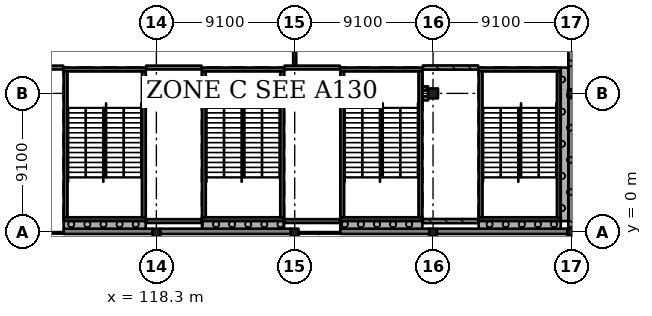
"""IFC4 building model, lengths in metres.
Left out: names, types, materials, properties, quantities, classifications, styles, units other than length and angle.
Written with IfcOpenShell. Run it as: python <this file> out.ifc"""

import sys

from ifc_helpers import new_model, si_unit, direction, frame, frame_2d, origin, origin_2d, place, context, subcontext, project, spatial, rectangle, extrude, element, fill, save


model = new_model("IFC4")
c1 = context("Model", 3, precision=1e-05, world=origin(), true_north=direction((0.0, 1.0)))
c2 = subcontext(c1, "Body", "Model", "MODEL_VIEW")
j1 = project(units=[si_unit("LENGTHUNIT", "METRE"), si_unit("PLANEANGLEUNIT", "RADIAN")], contexts=[c1])
p1 = place(None, origin())
s1 = spatial("IfcSite", under=j1, at=p1, CompositionType="ELEMENT")
p2 = place(p1, origin())
s2 = spatial("IfcBuilding", under=s1, at=p2, CompositionType="ELEMENT")
p3 = place(p2, frame((0.0, 0.0, 10.92)))
s3 = spatial("IfcBuildingStorey", under=s2, at=p3, CompositionType="ELEMENT", Elevation=10.92)
p4 = place(p3, frame((118.3, -0.05, 0.0), z_axis=(0.0, 0.0, 1.0), x_axis=(1.0, 0.0, 0.0)))
e1 = element("IfcColumn", 1, at=p4, inside=s3, PredefinedType="COLUMN", context=c2, shape_type="SweptSolid", body=[
    extrude(rectangle(XDim=0.5, YDim=0.5, at=origin_2d()), origin(), (0.0, 0.0, 1.0), 4.55),
])
p5 = place(p3, frame((118.3, 9.1, 0.0), z_axis=(0.0, 0.0, 1.0), x_axis=(1.0, 0.0, 0.0)))
e2 = element("IfcColumn", 2, at=p5, inside=s3, PredefinedType="COLUMN", context=c2, shape_type="SweptSolid", body=[
    extrude(rectangle(XDim=0.65, YDim=0.65, at=origin_2d()), origin(), (0.0, 0.0, 1.0), 4.55),
])
p6 = place(p3, frame((127.4, -0.05, 0.0), z_axis=(0.0, 0.0, 1.0), x_axis=(1.0, 0.0, 0.0)))
e3 = element("IfcColumn", 3, at=p6, inside=s3, PredefinedType="COLUMN", context=c2, shape_type="SweptSolid", body=[
    extrude(rectangle(XDim=0.5, YDim=0.5, at=origin_2d()), origin(), (0.0, 0.0, 1.0), 4.55),
])
p7 = place(p3, frame((127.4, 9.1, 0.0), z_axis=(0.0, 0.0, 1.0), x_axis=(1.0, 0.0, 0.0)))
e4 = element("IfcColumn", 4, at=p7, inside=s3, PredefinedType="COLUMN", context=c2, shape_type="SweptSolid", body=[
    extrude(rectangle(XDim=0.65, YDim=0.65, at=origin_2d()), origin(), (0.0, 0.0, 1.0), 4.55),
])
p8 = place(p3, frame((136.5, -0.05, 0.0), z_axis=(0.0, 0.0, 1.0), x_axis=(1.0, 0.0, 0.0)))
e5 = element("IfcColumn", 5, at=p8, inside=s3, PredefinedType="COLUMN", context=c2, shape_type="SweptSolid", body=[
    extrude(rectangle(XDim=0.5, YDim=0.5, at=origin_2d()), origin(), (0.0, 0.0, 1.0), 4.55),
])
p9 = place(p3, frame((136.5, 9.1, 0.0), z_axis=(0.0, 0.0, 1.0), x_axis=(1.0, 0.0, 0.0)))
e6 = element("IfcColumn", 6, at=p9, inside=s3, PredefinedType="COLUMN", context=c2, shape_type="SweptSolid", body=[
    extrude(rectangle(XDim=0.65, YDim=0.65, at=origin_2d()), origin(), (0.0, 0.0, 1.0), 4.55),
])
for number, where, z_axis, x_axis in (
    (7, (145.6, 0.0, 0.0), (0.0, 0.0, 1.0), (1.0, 0.0, 0.0)),
    (8, (145.625, 9.1, 0.0), (0.0, 0.0, 1.0), (1.0, 0.0, 0.0)),
):
    element("IfcColumn", number, at=place(p3, frame(where, z_axis=z_axis, x_axis=x_axis)), inside=s3, PredefinedType="COLUMN", context=c2, shape_type="SweptSolid", body=[
        extrude(rectangle(XDim=0.5, YDim=0.5, at=origin_2d()), origin(), (0.0, 0.0, 1.0), 4.55),
    ])
p10 = place(p3, frame((144.9, 0.825, 0.0), z_axis=(0.0, 0.0, 1.0), x_axis=(-1.0, 0.0, 0.0)))
e9 = element("IfcWall", 9, at=p10, inside=s3, PredefinedType="SHEAR", context=c2, shape_type="SweptSolid", body=[
    extrude(rectangle(XDim=5.4, YDim=0.25, at=frame_2d((2.7, 0.0))), origin(), (0.0, 0.0, 1.0), 4.55),
])
p11 = place(p3, frame((144.9, 10.675, 0.0), z_axis=(0.0, 0.0, 1.0), x_axis=(-1.0, 0.0, 0.0)))
e10 = element("IfcWall", 10, at=p11, inside=s3, PredefinedType="SHEAR", context=c2, shape_type="SweptSolid", body=[
    extrude(rectangle(XDim=5.4, YDim=0.25, at=frame_2d((2.7, 0.0))), origin(), (0.0, 0.0, 1.0), 4.55),
])
p12 = place(p11, frame((1.5, 0.0, 0.0)))
e11 = element("IfcOpeningElement", 11, at=p12, cuts=e10, PredefinedType="OPENING", context=c2, shape_type="SweptSolid", body=[
    extrude(rectangle(XDim=2.4, YDim=2.1, at=frame_2d((1.2, 1.05))), frame((0.0, 0.135, 0.0), z_axis=(0.0, -1.0, 0.0), x_axis=(1.0, 0.0, 0.0)), (0.0, 0.0, 1.0), 0.27),
])
for number, where, z_axis, x_axis in (
    (12, (139.625, 10.55, 0.0), (0.0, 0.0, 1.0), (0.0, -1.0, 0.0)),
    (13, (144.775, 10.55, 0.0), (0.0, 0.0, 1.0), (0.0, -1.0, 0.0)),
):
    element("IfcWall", number, at=place(p3, frame(where, z_axis=z_axis, x_axis=x_axis)), inside=s3, PredefinedType="SHEAR", context=c2, shape_type="SweptSolid", body=[
        extrude(rectangle(XDim=9.6, YDim=0.25, at=frame_2d((4.8, 0.0))), origin(), (0.0, 0.0, 1.0), 4.55),
    ])
p13 = place(p3, frame((135.8, 0.825, 0.0), z_axis=(0.0, 0.0, 1.0), x_axis=(-1.0, 0.0, 0.0)))
e14 = element("IfcWall", 14, at=p13, inside=s3, PredefinedType="SHEAR", context=c2, shape_type="SweptSolid", body=[
    extrude(rectangle(XDim=5.4, YDim=0.25, at=frame_2d((2.7, 0.0))), origin(), (0.0, 0.0, 1.0), 4.55),
])
p14 = place(p3, frame((135.8, 10.675, 0.0), z_axis=(0.0, 0.0, 1.0), x_axis=(-1.0, 0.0, 0.0)))
e15 = element("IfcWall", 15, at=p14, inside=s3, PredefinedType="SHEAR", context=c2, shape_type="SweptSolid", body=[
    extrude(rectangle(XDim=5.4, YDim=0.25, at=frame_2d((2.7, 0.0))), origin(), (0.0, 0.0, 1.0), 4.55),
])
p15 = place(p14, frame((1.5, 0.0, 0.0)))
e16 = element("IfcOpeningElement", 16, at=p15, cuts=e15, PredefinedType="OPENING", context=c2, shape_type="SweptSolid", body=[
    extrude(rectangle(XDim=2.4, YDim=2.1, at=frame_2d((1.2, 1.05))), frame((0.0, 0.135, 0.0), z_axis=(0.0, -1.0, 0.0), x_axis=(1.0, 0.0, 0.0)), (0.0, 0.0, 1.0), 0.27),
])
for number, where, z_axis, x_axis in (
    (17, (130.525, 10.55, 0.0), (0.0, 0.0, 1.0), (0.0, -1.0, 0.0)),
    (18, (135.675, 10.55, 0.0), (0.0, 0.0, 1.0), (0.0, -1.0, 0.0)),
):
    element("IfcWall", number, at=place(p3, frame(where, z_axis=z_axis, x_axis=x_axis)), inside=s3, PredefinedType="SHEAR", context=c2, shape_type="SweptSolid", body=[
        extrude(rectangle(XDim=9.6, YDim=0.25, at=frame_2d((4.8, 0.0))), origin(), (0.0, 0.0, 1.0), 4.55),
    ])
p16 = place(p3, frame((126.7, 0.825, 0.0), z_axis=(0.0, 0.0, 1.0), x_axis=(-1.0, 0.0, 0.0)))
e19 = element("IfcWall", 19, at=p16, inside=s3, PredefinedType="SHEAR", context=c2, shape_type="SweptSolid", body=[
    extrude(rectangle(XDim=5.4, YDim=0.25, at=frame_2d((2.7, 0.0))), origin(), (0.0, 0.0, 1.0), 4.55),
])
p17 = place(p3, frame((126.7, 10.675, 0.0), z_axis=(0.0, 0.0, 1.0), x_axis=(-1.0, 0.0, 0.0)))
e20 = element("IfcWall", 20, at=p17, inside=s3, PredefinedType="SHEAR", context=c2, shape_type="SweptSolid", body=[
    extrude(rectangle(XDim=5.4, YDim=0.25, at=frame_2d((2.7, 0.0))), origin(), (0.0, 0.0, 1.0), 4.55),
])
p18 = place(p17, frame((1.5, 0.0, 0.0)))
e21 = element("IfcOpeningElement", 21, at=p18, cuts=e20, PredefinedType="OPENING", context=c2, shape_type="SweptSolid", body=[
    extrude(rectangle(XDim=2.4, YDim=2.1, at=frame_2d((1.2, 1.05))), frame((0.0, 0.135, 0.0), z_axis=(0.0, -1.0, 0.0), x_axis=(1.0, 0.0, 0.0)), (0.0, 0.0, 1.0), 0.27),
])
for number, where, z_axis, x_axis in (
    (22, (121.425, 10.55, 0.0), (0.0, 0.0, 1.0), (0.0, -1.0, 0.0)),
    (23, (126.575, 10.55, 0.0), (0.0, 0.0, 1.0), (0.0, -1.0, 0.0)),
):
    element("IfcWall", number, at=place(p3, frame(where, z_axis=z_axis, x_axis=x_axis)), inside=s3, PredefinedType="SHEAR", context=c2, shape_type="SweptSolid", body=[
        extrude(rectangle(XDim=9.6, YDim=0.25, at=frame_2d((4.8, 0.0))), origin(), (0.0, 0.0, 1.0), 4.55),
    ])
p19 = place(p3, frame((117.6, 0.825, 0.0), z_axis=(0.0, 0.0, 1.0), x_axis=(-1.0, 0.0, 0.0)))
e24 = element("IfcWall", 24, at=p19, inside=s3, PredefinedType="SHEAR", context=c2, shape_type="SweptSolid", body=[
    extrude(rectangle(XDim=5.4, YDim=0.25, at=frame_2d((2.7, 0.0))), origin(), (0.0, 0.0, 1.0), 4.55),
])
p20 = place(p3, frame((117.6, 10.675, 0.0), z_axis=(0.0, 0.0, 1.0), x_axis=(-1.0, 0.0, 0.0)))
e25 = element("IfcWall", 25, at=p20, inside=s3, PredefinedType="SHEAR", context=c2, shape_type="SweptSolid", body=[
    extrude(rectangle(XDim=5.4, YDim=0.25, at=frame_2d((2.7, 0.0))), origin(), (0.0, 0.0, 1.0), 4.55),
])
p21 = place(p20, frame((1.5, 0.0, 0.0)))
e26 = element("IfcOpeningElement", 26, at=p21, cuts=e25, PredefinedType="OPENING", context=c2, shape_type="SweptSolid", body=[
    extrude(rectangle(XDim=2.4, YDim=2.1, at=frame_2d((1.2, 1.05))), frame((0.0, 0.135, 0.0), z_axis=(0.0, -1.0, 0.0), x_axis=(1.0, 0.0, 0.0)), (0.0, 0.0, 1.0), 0.27),
])
for number, where, z_axis, x_axis in (
    (27, (112.325, 10.55, 0.0), (0.0, 0.0, 1.0), (0.0, -1.0, 0.0)),
    (28, (117.475, 10.55, 0.0), (0.0, 0.0, 1.0), (0.0, -1.0, 0.0)),
):
    element("IfcWall", number, at=place(p3, frame(where, z_axis=z_axis, x_axis=x_axis)), inside=s3, PredefinedType="SHEAR", context=c2, shape_type="SweptSolid", body=[
        extrude(rectangle(XDim=9.6, YDim=0.25, at=frame_2d((4.8, 0.0))), origin(), (0.0, 0.0, 1.0), 4.55),
    ])
p22 = place(p3, frame((112.2, 0.025, 0.0), z_axis=(0.0, 0.0, 1.0), x_axis=(1.0, 0.0, 0.0)))
e29 = element("IfcWall", 29, at=p22, inside=s3, PredefinedType="SOLIDWALL", context=c2, shape_type="SweptSolid", body=[
    extrude(rectangle(XDim=5.85, YDim=0.35, at=frame_2d((2.925, 0.0))), origin(), (0.0, 0.0, 1.0), 3.5),
])
p23 = place(p3, frame((118.55, 0.025, 0.0), z_axis=(0.0, 0.0, 1.0), x_axis=(1.0, 0.0, 0.0)))
e30 = element("IfcWall", 30, at=p23, inside=s3, PredefinedType="SOLIDWALL", context=c2, shape_type="SweptSolid", body=[
    extrude(rectangle(XDim=8.6, YDim=0.35, at=frame_2d((4.3, 0.0))), origin(), (0.0, 0.0, 1.0), 3.5),
])
p24 = place(p3, frame((130.4, 0.025, 0.0), z_axis=(0.0, 0.0, 1.0), x_axis=(1.0, 0.0, 0.0)))
e31 = element("IfcWall", 31, at=p24, inside=s3, PredefinedType="SOLIDWALL", context=c2, shape_type="SweptSolid", body=[
    extrude(rectangle(XDim=5.85, YDim=0.35, at=frame_2d((2.925, 0.0))), origin(), (0.0, 0.0, 1.0), 3.5),
])
for number, where, z_axis, x_axis in (
    (32, (136.75, 0.025, 0.0), (0.0, 0.0, 1.0), (1.0, 0.0, 0.0)),
    (33, (145.575, 0.25, 0.0), (0.0, 0.0, 1.0), (0.0, 1.0, 0.0)),
):
    element("IfcWall", number, at=place(p3, frame(where, z_axis=z_axis, x_axis=x_axis)), inside=s3, PredefinedType="SOLIDWALL", context=c2, shape_type="SweptSolid", body=[
        extrude(rectangle(XDim=8.6, YDim=0.35, at=frame_2d((4.3, 0.0))), origin(), (0.0, 0.0, 1.0), 3.5),
    ])
p25 = place(p3, frame((145.575, 9.35, 0.0), z_axis=(0.0, 0.0, 1.0), x_axis=(0.0, 1.0, 0.0)))
e34 = element("IfcWall", 34, at=p25, inside=s3, PredefinedType="SOLIDWALL", context=c2, shape_type="SweptSolid", body=[
    extrude(rectangle(XDim=8.575, YDim=0.35, at=frame_2d((4.288, 0.0))), origin(), (0.0, 0.0, 1.0), 3.5),
])
p26 = place(p3, frame((139.5, 0.45, 0.0), z_axis=(0.0, 0.0, 1.0), x_axis=(1.0, 0.0, 0.0)))
e35 = element("IfcWall", 35, at=p26, inside=s3, PredefinedType="SOLIDWALL", context=c2, shape_type="SweptSolid", body=[
    extrude(rectangle(XDim=5.4, YDim=0.5, at=frame_2d((2.7, 0.0))), origin(), (0.0, 0.0, 1.0), 4.55),
])
p27 = place(p3, frame((145.15, 0.7, 0.0), z_axis=(0.0, 0.0, 1.0), x_axis=(0.0, 1.0, 0.0)))
e36 = element("IfcWall", 36, at=p27, inside=s3, PredefinedType="SOLIDWALL", context=c2, shape_type="SweptSolid", body=[
    extrude(rectangle(XDim=10.1, YDim=0.5, at=frame_2d((5.05, 0.0))), origin(), (0.0, 0.0, 1.0), 4.55),
])
p28 = place(p3, frame((130.4, 0.45, 0.0), z_axis=(0.0, 0.0, 1.0), x_axis=(1.0, 0.0, 0.0)))
e37 = element("IfcWall", 37, at=p28, inside=s3, PredefinedType="SOLIDWALL", context=c2, shape_type="SweptSolid", body=[
    extrude(rectangle(XDim=5.4, YDim=0.5, at=frame_2d((2.7, 0.0))), origin(), (0.0, 0.0, 1.0), 4.55),
])
p29 = place(p3, frame((121.3, 0.45, 0.0), z_axis=(0.0, 0.0, 1.0), x_axis=(1.0, 0.0, 0.0)))
e38 = element("IfcWall", 38, at=p29, inside=s3, PredefinedType="SOLIDWALL", context=c2, shape_type="SweptSolid", body=[
    extrude(rectangle(XDim=5.4, YDim=0.5, at=frame_2d((2.7, 0.0))), origin(), (0.0, 0.0, 1.0), 4.55),
])
p30 = place(p3, frame((112.2, 0.45, 0.0), z_axis=(0.0, 0.0, 1.0), x_axis=(1.0, 0.0, 0.0)))
e39 = element("IfcWall", 39, at=p30, inside=s3, PredefinedType="SOLIDWALL", context=c2, shape_type="SweptSolid", body=[
    extrude(rectangle(XDim=5.4, YDim=0.5, at=frame_2d((2.7, 0.0))), origin(), (0.0, 0.0, 1.0), 4.55),
])
p31 = place(p3, frame((112.17, 10.8, 0.0), z_axis=(0.0, 0.0, 1.0), x_axis=(-1.0, 0.0, 0.0)))
e40 = element("IfcWall", 40, at=p31, inside=s3, PredefinedType="SOLIDWALL", context=c2, shape_type="SweptSolid", body=[
    extrude(rectangle(XDim=2.72, YDim=0.25, at=frame_2d((1.36, 0.0))), origin(), (0.0, 0.0, 1.0), 4.25),
])
for number, where, z_axis, x_axis in (
    (41, (117.63, 8.775, 0.0), (0.0, 0.0, 1.0), (1.0, 0.0, 0.0)),
    (42, (117.975, 9.425, 0.0), (0.0, 0.0, 1.0), (-1.0, 0.0, 0.0)),
):
    element("IfcWall", number, at=place(p3, frame(where, z_axis=z_axis, x_axis=x_axis)), inside=s3, PredefinedType="SOLIDWALL", context=c2, shape_type="SweptSolid", body=[
        extrude(rectangle(XDim=0.345, YDim=0.25, at=frame_2d((0.173, 0.0))), origin(), (0.0, 0.0, 1.0), 4.25),
    ])
p32 = place(p3, frame((121.27, 0.7, 0.0), z_axis=(0.0, 0.0, 1.0), x_axis=(-1.0, 0.0, 0.0)))
e43 = element("IfcWall", 43, at=p32, inside=s3, PredefinedType="SOLIDWALL", context=c2, shape_type="SweptSolid", body=[
    extrude(rectangle(XDim=3.64, YDim=0.25, at=frame_2d((1.82, 0.0))), origin(), (0.0, 0.0, 1.0), 4.25),
])
p33 = place(p3, frame((121.27, 10.8, 0.0), z_axis=(0.0, 0.0, 1.0), x_axis=(-1.0, 0.0, 0.0)))
e44 = element("IfcWall", 44, at=p33, inside=s3, PredefinedType="SOLIDWALL", context=c2, shape_type="SweptSolid", body=[
    extrude(rectangle(XDim=3.64, YDim=0.25, at=frame_2d((1.82, 0.0))), origin(), (0.0, 0.0, 1.0), 4.25),
])
p34 = place(p33, frame((1.45, 0.0, 0.0)))
e45 = element("IfcOpeningElement", 45, at=p34, cuts=e44, PredefinedType="OPENING", context=c2, shape_type="SweptSolid", body=[
    extrude(rectangle(XDim=0.8, YDim=2.1, at=frame_2d((0.4, 1.05))), frame((0.0, 0.135, 0.0), z_axis=(0.0, -1.0, 0.0), x_axis=(1.0, 0.0, 0.0)), (0.0, 0.0, 1.0), 0.27),
])
for number, where, z_axis, x_axis in (
    (46, (126.73, 8.775, 0.0), (0.0, 0.0, 1.0), (1.0, 0.0, 0.0)),
    (47, (127.075, 9.425, 0.0), (0.0, 0.0, 1.0), (-1.0, 0.0, 0.0)),
):
    element("IfcWall", number, at=place(p3, frame(where, z_axis=z_axis, x_axis=x_axis)), inside=s3, PredefinedType="SOLIDWALL", context=c2, shape_type="SweptSolid", body=[
        extrude(rectangle(XDim=0.345, YDim=0.25, at=frame_2d((0.172, 0.0))), origin(), (0.0, 0.0, 1.0), 4.25),
    ])
p35 = place(p3, frame((126.73, 10.8, 0.0), z_axis=(0.0, 0.0, 1.0), x_axis=(1.0, 0.0, 0.0)))
e48 = element("IfcWall", 48, at=p35, inside=s3, PredefinedType="SOLIDWALL", context=c2, shape_type="SweptSolid", body=[
    extrude(rectangle(XDim=3.64, YDim=0.25, at=frame_2d((1.82, 0.0))), origin(), (0.0, 0.0, 1.0), 4.25),
])
p36 = place(p35, frame((1.69, 0.0, 0.0)))
e49 = element("IfcOpeningElement", 49, at=p36, cuts=e48, PredefinedType="OPENING", context=c2, shape_type="SweptSolid", body=[
    extrude(rectangle(XDim=1.0, YDim=2.1, at=frame_2d((0.5, 1.05))), frame((0.0, 0.135, 0.0), z_axis=(0.0, -1.0, 0.0), x_axis=(1.0, 0.0, 0.0)), (0.0, 0.0, 1.0), 0.27),
])
p37 = place(p3, frame((127.4, 10.925, 0.0), z_axis=(0.0, 0.0, 1.0), x_axis=(0.0, 1.0, 0.0)))
e50 = element("IfcWall", 50, at=p37, inside=s3, PredefinedType="PARTITIONING", context=c2, shape_type="SweptSolid", body=[
    extrude(rectangle(XDim=6.9, YDim=0.2, at=frame_2d((3.45, 0.0))), origin(), (0.0, 0.0, 1.0), 3.55),
])
p38 = place(p37, frame((0.85, 0.0, 0.0)))
e51 = element("IfcOpeningElement", 51, at=p38, cuts=e50, PredefinedType="OPENING", context=c2, shape_type="SweptSolid", body=[
    extrude(rectangle(XDim=1.8, YDim=2.4, at=frame_2d((0.9, 1.2))), frame((0.0, 0.11, 0.0), z_axis=(0.0, -1.0, 0.0), x_axis=(1.0, 0.0, 0.0)), (0.0, 0.0, 1.0), 0.22),
])
p39 = place(p37, frame((4.25, 0.0, 0.0)))
e52 = element("IfcOpeningElement", 52, at=p39, cuts=e50, PredefinedType="OPENING", context=c2, shape_type="SweptSolid", body=[
    extrude(rectangle(XDim=1.8, YDim=2.4, at=frame_2d((0.9, 1.2))), frame((0.0, 0.11, 0.0), z_axis=(0.0, -1.0, 0.0), x_axis=(1.0, 0.0, 0.0)), (0.0, 0.0, 1.0), 0.22),
])
p40 = place(p3, frame((130.37, 0.7, 0.0), z_axis=(0.0, 0.0, 1.0), x_axis=(-1.0, 0.0, 0.0)))
e53 = element("IfcWall", 53, at=p40, inside=s3, PredefinedType="SOLIDWALL", context=c2, shape_type="SweptSolid", body=[
    extrude(rectangle(XDim=3.64, YDim=0.25, at=frame_2d((1.82, 0.0))), origin(), (0.0, 0.0, 1.0), 4.25),
])
for number, where, z_axis, x_axis in (
    (54, (135.83, 8.775, 0.0), (0.0, 0.0, 1.0), (1.0, 0.0, 0.0)),
    (55, (136.175, 9.425, 0.0), (0.0, 0.0, 1.0), (-1.0, 0.0, 0.0)),
):
    element("IfcWall", number, at=place(p3, frame(where, z_axis=z_axis, x_axis=x_axis)), inside=s3, PredefinedType="SOLIDWALL", context=c2, shape_type="SweptSolid", body=[
        extrude(rectangle(XDim=0.345, YDim=0.275, at=frame_2d((0.172, 0.0))), origin(), (0.0, 0.0, 1.0), 4.25),
    ])
p41 = place(p3, frame((139.47, 0.7, 0.0), z_axis=(0.0, 0.0, 1.0), x_axis=(-1.0, 0.0, 0.0)))
e56 = element("IfcWall", 56, at=p41, inside=s3, PredefinedType="SOLIDWALL", context=c2, shape_type="SweptSolid", body=[
    extrude(rectangle(XDim=3.64, YDim=0.275, at=frame_2d((1.82, 0.0))), origin(), (0.0, 0.0, 1.0), 4.25),
])
p42 = place(p3, frame((139.47, 10.8, 0.0), z_axis=(0.0, 0.0, 1.0), x_axis=(-1.0, 0.0, 0.0)))
e57 = element("IfcWall", 57, at=p42, inside=s3, PredefinedType="SOLIDWALL", context=c2, shape_type="SweptSolid", body=[
    extrude(rectangle(XDim=3.64, YDim=0.275, at=frame_2d((1.82, 0.0))), origin(), (0.0, 0.0, 1.0), 4.25),
])
p43 = place(p42, frame((1.25, 0.0, 0.0)))
e58 = element("IfcOpeningElement", 58, at=p43, cuts=e57, PredefinedType="OPENING", context=c2, shape_type="SweptSolid", body=[
    extrude(rectangle(XDim=1.2, YDim=2.4, at=frame_2d((0.6, 1.2))), frame((0.0, 0.147, 0.0), z_axis=(0.0, -1.0, 0.0), x_axis=(1.0, 0.0, 0.0)), (0.0, 0.0, 1.0), 0.295),
])
p44 = place(p43, origin())
e59 = element("IfcDoor", 59, at=p44, inside=s3, OperationType="SINGLE_SWING_LEFT", PredefinedType="DOOR", context=c2, shape_type="SweptSolid", body=[
    extrude(rectangle(XDim=1.2, YDim=2.4, at=frame_2d((0.6, 1.2))), frame((0.0, 0.025, 0.0), z_axis=(0.0, -1.0, 0.0), x_axis=(1.0, 0.0, 0.0)), (0.0, 0.0, 1.0), 0.05),
])
fill(e58, e59)
p45 = place(p36, origin())
e60 = element("IfcDoor", 60, at=p45, inside=s3, OperationType="SINGLE_SWING_RIGHT", PredefinedType="DOOR", context=c2, shape_type="SweptSolid", body=[
    extrude(rectangle(XDim=1.0, YDim=2.1, at=frame_2d((0.5, 1.05))), frame((0.0, 0.025, 0.0), z_axis=(0.0, -1.0, 0.0), x_axis=(1.0, 0.0, 0.0)), (0.0, 0.0, 1.0), 0.05),
])
fill(e49, e60)
p46 = place(p34, origin())
e61 = element("IfcDoor", 61, at=p46, inside=s3, OperationType="SINGLE_SWING_LEFT", PredefinedType="DOOR", context=c2, shape_type="SweptSolid", body=[
    extrude(rectangle(XDim=0.8, YDim=2.1, at=frame_2d((0.4, 1.05))), frame((0.0, 0.025, 0.0), z_axis=(0.0, -1.0, 0.0), x_axis=(1.0, 0.0, 0.0)), (0.0, 0.0, 1.0), 0.05),
])
fill(e45, e61)
p47 = place(p38, origin())
e62 = element("IfcDoor", 62, at=p47, inside=s3, OperationType="DOUBLE_DOOR_SINGLE_SWING", PredefinedType="DOOR", context=c2, shape_type="SweptSolid", body=[
    extrude(rectangle(XDim=1.8, YDim=2.4, at=frame_2d((0.9, 1.2))), frame((0.0, 0.025, 0.0), z_axis=(0.0, -1.0, 0.0), x_axis=(1.0, 0.0, 0.0)), (0.0, 0.0, 1.0), 0.05),
])
fill(e51, e62)
p48 = place(p12, origin())
e63 = element("IfcDoor", 63, at=p48, inside=s3, OperationType="DOUBLE_DOOR_SINGLE_SWING", PredefinedType="DOOR", context=c2, shape_type="SweptSolid", body=[
    extrude(rectangle(XDim=2.4, YDim=2.1, at=frame_2d((1.2, 1.05))), frame((0.0, 0.025, 0.0), z_axis=(0.0, -1.0, 0.0), x_axis=(1.0, 0.0, 0.0)), (0.0, 0.0, 1.0), 0.05),
])
fill(e11, e63)
p49 = place(p15, origin())
e64 = element("IfcDoor", 64, at=p49, inside=s3, OperationType="DOUBLE_DOOR_SINGLE_SWING", PredefinedType="DOOR", context=c2, shape_type="SweptSolid", body=[
    extrude(rectangle(XDim=2.4, YDim=2.1, at=frame_2d((1.2, 1.05))), frame((0.0, 0.025, 0.0), z_axis=(0.0, -1.0, 0.0), x_axis=(1.0, 0.0, 0.0)), (0.0, 0.0, 1.0), 0.05),
])
fill(e16, e64)
p50 = place(p18, origin())
e65 = element("IfcDoor", 65, at=p50, inside=s3, OperationType="DOUBLE_DOOR_SINGLE_SWING", PredefinedType="DOOR", context=c2, shape_type="SweptSolid", body=[
    extrude(rectangle(XDim=2.4, YDim=2.1, at=frame_2d((1.2, 1.05))), frame((0.0, 0.025, 0.0), z_axis=(0.0, -1.0, 0.0), x_axis=(1.0, 0.0, 0.0)), (0.0, 0.0, 1.0), 0.05),
])
fill(e21, e65)
p51 = place(p21, origin())
e66 = element("IfcDoor", 66, at=p51, inside=s3, OperationType="DOUBLE_DOOR_SINGLE_SWING", PredefinedType="DOOR", context=c2, shape_type="SweptSolid", body=[
    extrude(rectangle(XDim=2.4, YDim=2.1, at=frame_2d((1.2, 1.05))), frame((0.0, 0.025, 0.0), z_axis=(0.0, -1.0, 0.0), x_axis=(1.0, 0.0, 0.0)), (0.0, 0.0, 1.0), 0.05),
])
fill(e26, e66)
save(model, sys.argv[1])
